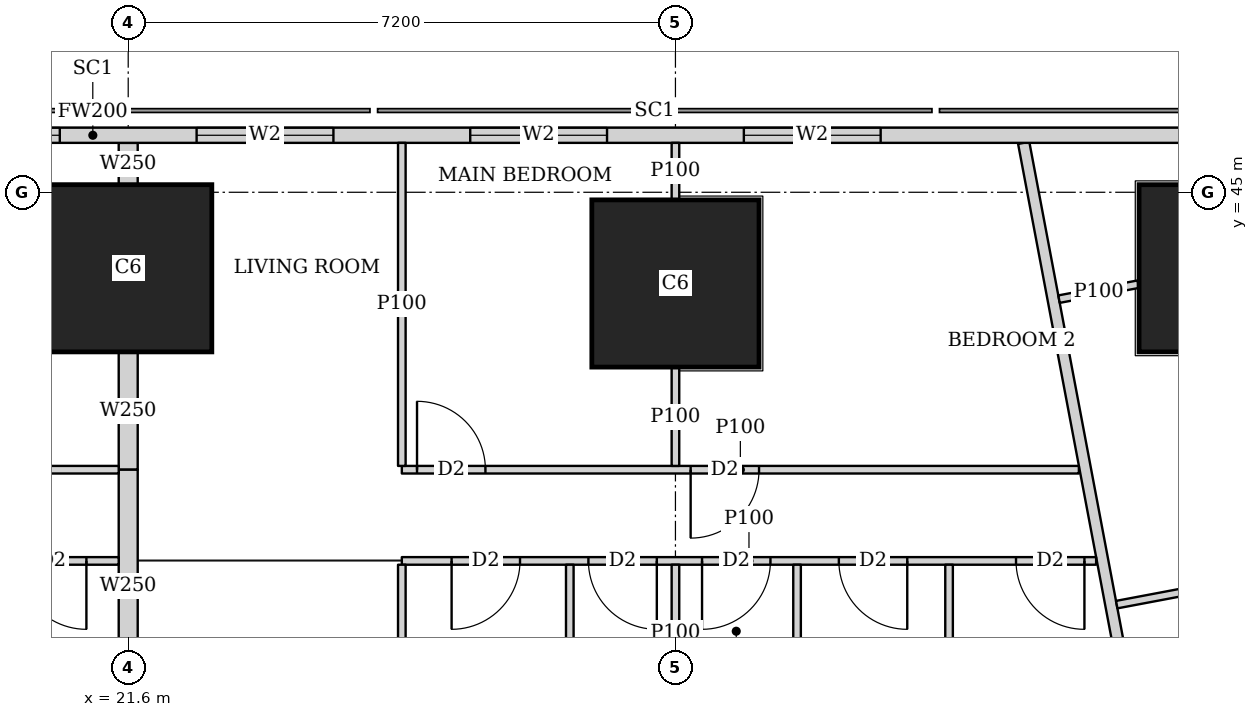
"""IFC4 building model, lengths in metres.
Left out: names, types, materials, properties, quantities, classifications, styles, units other than length and angle.
Written with IfcOpenShell. Run it as: python <this file> out.ifc"""

import sys

from ifc_helpers import new_model, si_unit, direction, frame, frame_2d, origin, origin_2d, place, context, subcontext, project, spatial, rectangle, extrude, element, fill, save


model = new_model("IFC4")
c1 = context("Model", 3, precision=1e-05, world=origin(), true_north=direction((0.0, 1.0)))
c2 = subcontext(c1, "Body", "Model", "MODEL_VIEW")
j1 = project(units=[si_unit("LENGTHUNIT", "METRE"), si_unit("PLANEANGLEUNIT", "RADIAN")], contexts=[c1])
p1 = place(None, origin())
s1 = spatial("IfcSite", under=j1, at=p1, CompositionType="ELEMENT")
p2 = place(p1, origin())
s2 = spatial("IfcBuilding", under=s1, at=p2, CompositionType="ELEMENT")
p3 = place(p2, frame((0.0, 0.0, 100.4)))
s3 = spatial("IfcBuildingStorey", under=s2, at=p3, CompositionType="ELEMENT", Elevation=100.4)
for number, where, z_axis, x_axis in (
    (1, (21.6, 44.0, 0.0), (0.0, 0.0, 1.0), (1.0, 0.0, 0.0)),
    (2, (28.8, 43.8, 0.0), (0.0, 0.0, 1.0), (1.0, 0.0, 0.0)),
    (3, (36.0, 44.0, 0.0), (0.0, 0.0, 1.0), (1.0, 0.0, 0.0)),
):
    element("IfcColumn", number, at=place(p3, frame(where, z_axis=z_axis, x_axis=x_axis)), inside=s3, PredefinedType="COLUMN", context=c2, shape_type="SweptSolid", body=[
        extrude(rectangle(XDim=2.2, YDim=2.2, at=origin_2d()), origin(), (0.0, 0.0, 1.0), 3.75),
    ])
p4 = place(p3, frame((40.106, 45.75, 0.0), z_axis=(0.0, 0.0, 1.0), x_axis=(-1.0, 0.0, 0.0)))
e4 = element("IfcWall", 4, at=p4, inside=s3, PredefinedType="SOLIDWALL", context=c2, shape_type="SweptSolid", body=[
    extrude(rectangle(XDim=37.943, YDim=0.2, at=frame_2d((18.971, 0.0))), origin(), (0.0, 0.0, 1.0), 3.5),
])
p5 = place(p4, frame((8.606, 0.0, 0.9)))
e5 = element("IfcOpeningElement", 5, at=p5, cuts=e4, PredefinedType="OPENING", context=c2, shape_type="SweptSolid", body=[
    extrude(rectangle(XDim=1.8, YDim=1.5, at=frame_2d((0.9, 0.75))), frame((0.0, 0.11, 0.0), z_axis=(0.0, -1.0, 0.0), x_axis=(1.0, 0.0, 0.0)), (0.0, 0.0, 1.0), 0.22),
])
p6 = place(p4, frame((12.206, 0.0, 0.9)))
e6 = element("IfcOpeningElement", 6, at=p6, cuts=e4, PredefinedType="OPENING", context=c2, shape_type="SweptSolid", body=[
    extrude(rectangle(XDim=1.8, YDim=1.5, at=frame_2d((0.9, 0.75))), frame((0.0, 0.11, 0.0), z_axis=(0.0, -1.0, 0.0), x_axis=(1.0, 0.0, 0.0)), (0.0, 0.0, 1.0), 0.22),
])
p7 = place(p4, frame((15.806, 0.0, 0.9)))
e7 = element("IfcOpeningElement", 7, at=p7, cuts=e4, PredefinedType="OPENING", context=c2, shape_type="SweptSolid", body=[
    extrude(rectangle(XDim=1.8, YDim=1.5, at=frame_2d((0.9, 0.75))), frame((0.0, 0.11, 0.0), z_axis=(0.0, -1.0, 0.0), x_axis=(1.0, 0.0, 0.0)), (0.0, 0.0, 1.0), 0.22),
])
p8 = place(p4, frame((19.406, 0.0, 0.9)))
e8 = element("IfcOpeningElement", 8, at=p8, cuts=e4, PredefinedType="OPENING", context=c2, shape_type="SweptSolid", body=[
    extrude(rectangle(XDim=1.8, YDim=1.5, at=frame_2d((0.9, 0.75))), frame((0.0, 0.11, 0.0), z_axis=(0.0, -1.0, 0.0), x_axis=(1.0, 0.0, 0.0)), (0.0, 0.0, 1.0), 0.22),
])
p9 = place(p4, frame((23.006, 0.0, 0.9)))
e9 = element("IfcOpeningElement", 9, at=p9, cuts=e4, PredefinedType="OPENING", context=c2, shape_type="SweptSolid", body=[
    extrude(rectangle(XDim=1.8, YDim=1.5, at=frame_2d((0.9, 0.75))), frame((0.0, 0.11, 0.0), z_axis=(0.0, -1.0, 0.0), x_axis=(1.0, 0.0, 0.0)), (0.0, 0.0, 1.0), 0.22),
])
p10 = place(p4, frame((26.606, 0.0, 0.9)))
e10 = element("IfcOpeningElement", 10, at=p10, cuts=e4, PredefinedType="OPENING", context=c2, shape_type="SweptSolid", body=[
    extrude(rectangle(XDim=1.8, YDim=1.5, at=frame_2d((0.9, 0.75))), frame((0.0, 0.11, 0.0), z_axis=(0.0, -1.0, 0.0), x_axis=(1.0, 0.0, 0.0)), (0.0, 0.0, 1.0), 0.22),
])
p11 = place(p3, frame((33.382, 45.65, 0.0), z_axis=(0.0, 0.0, 1.0), x_axis=(0.185593544777, -0.982626600565, 0.0)))
e11 = element("IfcWall", 11, at=p11, inside=s3, PredefinedType="SOLIDWALL", context=c2, shape_type="SweptSolid", body=[
    extrude(rectangle(XDim=47.118, YDim=0.15, at=frame_2d((23.559, 0.0))), origin(), (0.0, 0.0, 1.0), 2.2),
])
p12 = place(p11, frame((10.662, 0.0, 0.0)))
e12 = element("IfcOpeningElement", 12, at=p12, cuts=e11, PredefinedType="OPENING", context=c2, shape_type="SweptSolid", body=[
    extrude(rectangle(XDim=1.0, YDim=2.1, at=frame_2d((0.5, 1.05))), frame((0.0, 0.085, 0.0), z_axis=(0.0, -1.0, 0.0), x_axis=(1.0, 0.0, 0.0)), (0.0, 0.0, 1.0), 0.17),
])
p13 = place(p11, frame((15.237, 0.0, 0.0)))
e13 = element("IfcOpeningElement", 13, at=p13, cuts=e11, PredefinedType="OPENING", context=c2, shape_type="SweptSolid", body=[
    extrude(rectangle(XDim=1.0, YDim=2.1, at=frame_2d((0.5, 1.05))), frame((0.0, 0.085, 0.0), z_axis=(0.0, -1.0, 0.0), x_axis=(1.0, 0.0, 0.0)), (0.0, 0.0, 1.0), 0.17),
])
p14 = place(p11, frame((27.341, 0.0, 0.0)))
e14 = element("IfcOpeningElement", 14, at=p14, cuts=e11, PredefinedType="OPENING", context=c2, shape_type="SweptSolid", body=[
    extrude(rectangle(XDim=1.0, YDim=2.1, at=frame_2d((0.5, 1.05))), frame((0.0, 0.085, 0.0), z_axis=(0.0, -1.0, 0.0), x_axis=(1.0, 0.0, 0.0)), (0.0, 0.0, 1.0), 0.17),
])
p15 = place(p11, frame((33.833, 0.0, 0.0)))
e15 = element("IfcOpeningElement", 15, at=p15, cuts=e11, PredefinedType="OPENING", context=c2, shape_type="SweptSolid", body=[
    extrude(rectangle(XDim=1.0, YDim=2.1, at=frame_2d((0.5, 1.05))), frame((0.0, 0.085, 0.0), z_axis=(0.0, -1.0, 0.0), x_axis=(1.0, 0.0, 0.0)), (0.0, 0.0, 1.0), 0.17),
])
p16 = place(p3, frame((34.89, 43.791, 0.0), z_axis=(0.0, 0.0, 1.0), x_axis=(-0.982621304855, -0.185621580763, 0.0)))
e16 = element("IfcWall", 16, at=p16, inside=s3, PredefinedType="PARTITIONING", context=c2, shape_type="SweptSolid", body=[
    extrude(rectangle(XDim=1.062, YDim=0.1, at=frame_2d((0.531, 0.0))), origin(), (0.0, 0.0, 1.0), 2.05),
])
p17 = place(p3, frame((37.823, 40.182, 0.0), z_axis=(0.0, 0.0, 1.0), x_axis=(-0.982664729897, -0.18539155487, 0.0)))
e17 = element("IfcWall", 17, at=p17, inside=s3, PredefinedType="PARTITIONING", context=c2, shape_type="SweptSolid", body=[
    extrude(rectangle(XDim=3.274, YDim=0.1, at=frame_2d((1.637, 0.0))), origin(), (0.0, 0.0, 1.0), 3.5),
])
p18 = place(p3, frame((14.4, 41.35, 0.0), z_axis=(0.0, 0.0, 1.0), x_axis=(1.0, 0.0, 0.0)))
e18 = element("IfcWall", 18, at=p18, inside=s3, PredefinedType="PARTITIONING", context=c2, shape_type="SweptSolid", body=[
    extrude(rectangle(XDim=7.075, YDim=0.1, at=frame_2d((3.538, 0.0))), origin(), (0.0, 0.0, 1.0), 3.5),
])
p19 = place(p18, frame((0.2, 0.0, 0.0)))
e19 = element("IfcOpeningElement", 19, at=p19, cuts=e18, PredefinedType="OPENING", context=c2, shape_type="SweptSolid", body=[
    extrude(rectangle(XDim=0.9, YDim=2.1, at=frame_2d((0.45, 1.05))), frame((0.0, 0.06, 0.0), z_axis=(0.0, -1.0, 0.0), x_axis=(1.0, 0.0, 0.0)), (0.0, 0.0, 1.0), 0.12),
])
p20 = place(p18, frame((3.8, 0.0, 0.0)))
e20 = element("IfcOpeningElement", 20, at=p20, cuts=e18, PredefinedType="OPENING", context=c2, shape_type="SweptSolid", body=[
    extrude(rectangle(XDim=0.9, YDim=2.1, at=frame_2d((0.45, 1.05))), frame((0.0, 0.06, 0.0), z_axis=(0.0, -1.0, 0.0), x_axis=(1.0, 0.0, 0.0)), (0.0, 0.0, 1.0), 0.12),
])
p21 = place(p3, frame((14.4, 40.15, 0.0), z_axis=(0.0, 0.0, 1.0), x_axis=(1.0, 0.0, 0.0)))
e21 = element("IfcWall", 21, at=p21, inside=s3, PredefinedType="PARTITIONING", context=c2, shape_type="SweptSolid", body=[
    extrude(rectangle(XDim=7.075, YDim=0.1, at=frame_2d((3.538, 0.0))), origin(), (0.0, 0.0, 1.0), 3.5),
])
p22 = place(p21, frame((0.655, 0.0, 0.0)))
e22 = element("IfcOpeningElement", 22, at=p22, cuts=e21, PredefinedType="OPENING", context=c2, shape_type="SweptSolid", body=[
    extrude(rectangle(XDim=0.9, YDim=2.1, at=frame_2d((0.45, 1.05))), frame((0.0, 0.06, 0.0), z_axis=(0.0, -1.0, 0.0), x_axis=(1.0, 0.0, 0.0)), (0.0, 0.0, 1.0), 0.12),
])
p23 = place(p21, frame((3.95, 0.0, 0.0)))
e23 = element("IfcOpeningElement", 23, at=p23, cuts=e21, PredefinedType="OPENING", context=c2, shape_type="SweptSolid", body=[
    extrude(rectangle(XDim=0.9, YDim=2.1, at=frame_2d((0.45, 1.05))), frame((0.0, 0.06, 0.0), z_axis=(0.0, -1.0, 0.0), x_axis=(1.0, 0.0, 0.0)), (0.0, 0.0, 1.0), 0.12),
])
p24 = place(p21, frame((2.455, 0.0, 0.0)))
e24 = element("IfcOpeningElement", 24, at=p24, cuts=e21, PredefinedType="OPENING", context=c2, shape_type="SweptSolid", body=[
    extrude(rectangle(XDim=0.9, YDim=2.1, at=frame_2d((0.45, 1.05))), frame((0.0, 0.06, 0.0), z_axis=(0.0, -1.0, 0.0), x_axis=(1.0, 0.0, 0.0)), (0.0, 0.0, 1.0), 0.12),
])
p25 = place(p21, frame((5.75, 0.0, 0.0)))
e25 = element("IfcOpeningElement", 25, at=p25, cuts=e21, PredefinedType="OPENING", context=c2, shape_type="SweptSolid", body=[
    extrude(rectangle(XDim=0.9, YDim=2.1, at=frame_2d((0.45, 1.05))), frame((0.0, 0.06, 0.0), z_axis=(0.0, -1.0, 0.0), x_axis=(1.0, 0.0, 0.0)), (0.0, 0.0, 1.0), 0.12),
])
p26 = place(p3, frame((25.2, 41.35, 0.0), z_axis=(0.0, 0.0, 1.0), x_axis=(1.0, 0.0, 0.0)))
e26 = element("IfcWall", 26, at=p26, inside=s3, PredefinedType="PARTITIONING", context=c2, shape_type="SweptSolid", body=[
    extrude(rectangle(XDim=8.908, YDim=0.1, at=frame_2d((4.454, 0.0))), origin(), (0.0, 0.0, 1.0), 3.5),
])
p27 = place(p26, frame((0.2, 0.0, 0.0)))
e27 = element("IfcOpeningElement", 27, at=p27, cuts=e26, PredefinedType="OPENING", context=c2, shape_type="SweptSolid", body=[
    extrude(rectangle(XDim=0.9, YDim=2.1, at=frame_2d((0.45, 1.05))), frame((0.0, 0.06, 0.0), z_axis=(0.0, -1.0, 0.0), x_axis=(1.0, 0.0, 0.0)), (0.0, 0.0, 1.0), 0.12),
])
p28 = place(p26, frame((3.8, 0.0, 0.0)))
e28 = element("IfcOpeningElement", 28, at=p28, cuts=e26, PredefinedType="OPENING", context=c2, shape_type="SweptSolid", body=[
    extrude(rectangle(XDim=0.9, YDim=2.1, at=frame_2d((0.45, 1.05))), frame((0.0, 0.06, 0.0), z_axis=(0.0, -1.0, 0.0), x_axis=(1.0, 0.0, 0.0)), (0.0, 0.0, 1.0), 0.12),
])
p29 = place(p3, frame((25.2, 40.15, 0.0), z_axis=(0.0, 0.0, 1.0), x_axis=(1.0, 0.0, 0.0)))
e29 = element("IfcWall", 29, at=p29, inside=s3, PredefinedType="PARTITIONING", context=c2, shape_type="SweptSolid", body=[
    extrude(rectangle(XDim=9.135, YDim=0.1, at=frame_2d((4.567, 0.0))), origin(), (0.0, 0.0, 1.0), 3.5),
])
p30 = place(p29, frame((0.655, 0.0, 0.0)))
e30 = element("IfcOpeningElement", 30, at=p30, cuts=e29, PredefinedType="OPENING", context=c2, shape_type="SweptSolid", body=[
    extrude(rectangle(XDim=0.9, YDim=2.1, at=frame_2d((0.45, 1.05))), frame((0.0, 0.06, 0.0), z_axis=(0.0, -1.0, 0.0), x_axis=(1.0, 0.0, 0.0)), (0.0, 0.0, 1.0), 0.12),
])
p31 = place(p29, frame((3.95, 0.0, 0.0)))
e31 = element("IfcOpeningElement", 31, at=p31, cuts=e29, PredefinedType="OPENING", context=c2, shape_type="SweptSolid", body=[
    extrude(rectangle(XDim=0.9, YDim=2.1, at=frame_2d((0.45, 1.05))), frame((0.0, 0.06, 0.0), z_axis=(0.0, -1.0, 0.0), x_axis=(1.0, 0.0, 0.0)), (0.0, 0.0, 1.0), 0.12),
])
p32 = place(p29, frame((8.081, 0.0, 0.0)))
e32 = element("IfcOpeningElement", 32, at=p32, cuts=e29, PredefinedType="OPENING", context=c2, shape_type="SweptSolid", body=[
    extrude(rectangle(XDim=0.9, YDim=2.1, at=frame_2d((0.45, 1.05))), frame((0.0, 0.06, 0.0), z_axis=(0.0, -1.0, 0.0), x_axis=(1.0, 0.0, 0.0)), (0.0, 0.0, 1.0), 0.12),
])
p33 = place(p29, frame((2.455, 0.0, 0.0)))
e33 = element("IfcOpeningElement", 33, at=p33, cuts=e29, PredefinedType="OPENING", context=c2, shape_type="SweptSolid", body=[
    extrude(rectangle(XDim=0.9, YDim=2.1, at=frame_2d((0.45, 1.05))), frame((0.0, 0.06, 0.0), z_axis=(0.0, -1.0, 0.0), x_axis=(1.0, 0.0, 0.0)), (0.0, 0.0, 1.0), 0.12),
])
p34 = place(p29, frame((5.75, 0.0, 0.0)))
e34 = element("IfcOpeningElement", 34, at=p34, cuts=e29, PredefinedType="OPENING", context=c2, shape_type="SweptSolid", body=[
    extrude(rectangle(XDim=0.9, YDim=2.1, at=frame_2d((0.45, 1.05))), frame((0.0, 0.06, 0.0), z_axis=(0.0, -1.0, 0.0), x_axis=(1.0, 0.0, 0.0)), (0.0, 0.0, 1.0), 0.12),
])
p35 = place(p3, frame((25.2, 41.4, 0.0), z_axis=(0.0, 0.0, 1.0), x_axis=(0.0, 1.0, 0.0)))
e35 = element("IfcWall", 35, at=p35, inside=s3, PredefinedType="PARTITIONING", context=c2, shape_type="SweptSolid", body=[
    extrude(rectangle(XDim=4.25, YDim=0.1, at=frame_2d((2.125, 0.0))), origin(), (0.0, 0.0, 1.0), 2.2),
])
p36 = place(p3, frame((28.8, 41.4, 0.0), z_axis=(0.0, 0.0, 1.0), x_axis=(0.0, 1.0, 0.0)))
e36 = element("IfcWall", 36, at=p36, inside=s3, PredefinedType="PARTITIONING", context=c2, shape_type="SweptSolid", body=[
    extrude(rectangle(XDim=1.299, YDim=0.1, at=frame_2d((0.649, 0.0))), origin(), (0.0, 0.0, 1.0), 3.5),
])
p37 = place(p3, frame((28.8, 44.901, 0.0), z_axis=(0.0, 0.0, 1.0), x_axis=(0.0, 1.0, 0.0)))
e37 = element("IfcWall", 37, at=p37, inside=s3, PredefinedType="PARTITIONING", context=c2, shape_type="SweptSolid", body=[
    extrude(rectangle(XDim=0.749, YDim=0.1, at=frame_2d((0.375, 0.0))), origin(), (0.0, 0.0, 1.0), 3.5),
])
p38 = place(p3, frame((25.2, 36.825, 0.0), z_axis=(0.0, 0.0, 1.0), x_axis=(0.0, 1.0, 0.0)))
e38 = element("IfcWall", 38, at=p38, inside=s3, PredefinedType="PARTITIONING", context=c2, shape_type="SweptSolid", body=[
    extrude(rectangle(XDim=3.275, YDim=0.1, at=frame_2d((1.638, 0.0))), origin(), (0.0, 0.0, 1.0), 3.5),
])
p39 = place(p3, frame((28.8, 38.301, 0.0), z_axis=(0.0, 0.0, 1.0), x_axis=(0.0, 1.0, 0.0)))
e39 = element("IfcWall", 39, at=p39, inside=s3, PredefinedType="PARTITIONING", context=c2, shape_type="SweptSolid", body=[
    extrude(rectangle(XDim=1.799, YDim=0.1, at=frame_2d((0.899, 0.0))), origin(), (0.0, 0.0, 1.0), 3.5),
])
for number, where, z_axis, x_axis in (
    (40, (32.4, 36.825, 0.0), (0.0, 0.0, 1.0), (0.0, 1.0, 0.0)),
    (41, (27.41, 36.825, 0.0), (0.0, 0.0, 1.0), (0.0, 1.0, 0.0)),
    (42, (30.4, 36.825, 0.0), (0.0, 0.0, 1.0), (0.0, 1.0, 0.0)),
):
    element("IfcWall", number, at=place(p3, frame(where, z_axis=z_axis, x_axis=x_axis)), inside=s3, PredefinedType="PARTITIONING", context=c2, shape_type="SweptSolid", body=[
        extrude(rectangle(XDim=3.275, YDim=0.1, at=frame_2d((1.638, 0.0))), origin(), (0.0, 0.0, 1.0), 3.5),
    ])
p40 = place(p3, frame((21.6, 41.35, 0.0), z_axis=(0.0, 0.0, 1.0), x_axis=(0.0, 1.0, 0.0)))
e43 = element("IfcWall", 43, at=p40, inside=s3, PredefinedType="SOLIDWALL", context=c2, shape_type="SweptSolid", body=[
    extrude(rectangle(XDim=1.549, YDim=0.25, at=frame_2d((0.774, 0.0))), origin(), (0.0, 0.0, 1.0), 3.5),
])
p41 = place(p3, frame((21.6, 45.101, 0.0), z_axis=(0.0, 0.0, 1.0), x_axis=(0.0, 1.0, 0.0)))
e44 = element("IfcWall", 44, at=p41, inside=s3, PredefinedType="SOLIDWALL", context=c2, shape_type="SweptSolid", body=[
    extrude(rectangle(XDim=0.549, YDim=0.25, at=frame_2d((0.274, 0.0))), origin(), (0.0, 0.0, 1.0), 3.5),
])
p42 = place(p3, frame((21.6, 38.301, 0.0), z_axis=(0.0, 0.0, 1.0), x_axis=(0.0, 1.0, 0.0)))
e45 = element("IfcWall", 45, at=p42, inside=s3, PredefinedType="SOLIDWALL", context=c2, shape_type="SweptSolid", body=[
    extrude(rectangle(XDim=3.049, YDim=0.25, at=frame_2d((1.524, 0.0))), origin(), (0.0, 0.0, 1.0), 3.5),
])
p43 = place(p5, origin())
e46 = element("IfcWindow", 46, at=p43, inside=s3, PartitioningType="SINGLE_PANEL", PredefinedType="WINDOW", context=c2, shape_type="SweptSolid", body=[
    extrude(rectangle(XDim=1.8, YDim=1.5, at=frame_2d((0.9, 0.75))), frame((0.0, 0.03, 0.0), z_axis=(0.0, -1.0, 0.0), x_axis=(1.0, 0.0, 0.0)), (0.0, 0.0, 1.0), 0.06),
])
fill(e5, e46)
p44 = place(p6, origin())
e47 = element("IfcWindow", 47, at=p44, inside=s3, PartitioningType="SINGLE_PANEL", PredefinedType="WINDOW", context=c2, shape_type="SweptSolid", body=[
    extrude(rectangle(XDim=1.8, YDim=1.5, at=frame_2d((0.9, 0.75))), frame((0.0, 0.03, 0.0), z_axis=(0.0, -1.0, 0.0), x_axis=(1.0, 0.0, 0.0)), (0.0, 0.0, 1.0), 0.06),
])
fill(e6, e47)
p45 = place(p7, origin())
e48 = element("IfcWindow", 48, at=p45, inside=s3, PartitioningType="SINGLE_PANEL", PredefinedType="WINDOW", context=c2, shape_type="SweptSolid", body=[
    extrude(rectangle(XDim=1.8, YDim=1.5, at=frame_2d((0.9, 0.75))), frame((0.0, 0.03, 0.0), z_axis=(0.0, -1.0, 0.0), x_axis=(1.0, 0.0, 0.0)), (0.0, 0.0, 1.0), 0.06),
])
fill(e7, e48)
p46 = place(p8, origin())
e49 = element("IfcWindow", 49, at=p46, inside=s3, PartitioningType="SINGLE_PANEL", PredefinedType="WINDOW", context=c2, shape_type="SweptSolid", body=[
    extrude(rectangle(XDim=1.8, YDim=1.5, at=frame_2d((0.9, 0.75))), frame((0.0, 0.03, 0.0), z_axis=(0.0, -1.0, 0.0), x_axis=(1.0, 0.0, 0.0)), (0.0, 0.0, 1.0), 0.06),
])
fill(e8, e49)
p47 = place(p25, origin())
e50 = element("IfcDoor", 50, at=p47, inside=s3, OperationType="SINGLE_SWING_LEFT", PredefinedType="DOOR", context=c2, shape_type="SweptSolid", body=[
    extrude(rectangle(XDim=0.9, YDim=2.1, at=frame_2d((0.45, 1.05))), frame((0.0, 0.025, 0.0), z_axis=(0.0, -1.0, 0.0), x_axis=(1.0, 0.0, 0.0)), (0.0, 0.0, 1.0), 0.05),
])
fill(e25, e50)
p48 = place(p27, origin())
e51 = element("IfcDoor", 51, at=p48, inside=s3, OperationType="SINGLE_SWING_LEFT", PredefinedType="DOOR", context=c2, shape_type="SweptSolid", body=[
    extrude(rectangle(XDim=0.9, YDim=2.1, at=frame_2d((0.45, 1.05))), frame((0.0, 0.025, 0.0), z_axis=(0.0, -1.0, 0.0), x_axis=(1.0, 0.0, 0.0)), (0.0, 0.0, 1.0), 0.05),
])
fill(e27, e51)
p49 = place(p28, origin())
e52 = element("IfcDoor", 52, at=p49, inside=s3, OperationType="SINGLE_SWING_RIGHT", PredefinedType="DOOR", context=c2, shape_type="SweptSolid", body=[
    extrude(rectangle(XDim=0.9, YDim=2.1, at=frame_2d((0.45, 1.05))), frame((0.0, 0.025, 0.0), z_axis=(0.0, -1.0, 0.0), x_axis=(1.0, 0.0, 0.0)), (0.0, 0.0, 1.0), 0.05),
])
fill(e28, e52)
p50 = place(p30, origin())
e53 = element("IfcDoor", 53, at=p50, inside=s3, OperationType="SINGLE_SWING_RIGHT", PredefinedType="DOOR", context=c2, shape_type="SweptSolid", body=[
    extrude(rectangle(XDim=0.9, YDim=2.1, at=frame_2d((0.45, 1.05))), frame((0.0, 0.025, 0.0), z_axis=(0.0, -1.0, 0.0), x_axis=(1.0, 0.0, 0.0)), (0.0, 0.0, 1.0), 0.05),
])
fill(e30, e53)
p51 = place(p31, origin())
e54 = element("IfcDoor", 54, at=p51, inside=s3, OperationType="SINGLE_SWING_RIGHT", PredefinedType="DOOR", context=c2, shape_type="SweptSolid", body=[
    extrude(rectangle(XDim=0.9, YDim=2.1, at=frame_2d((0.45, 1.05))), frame((0.0, 0.025, 0.0), z_axis=(0.0, -1.0, 0.0), x_axis=(1.0, 0.0, 0.0)), (0.0, 0.0, 1.0), 0.05),
])
fill(e31, e54)
p52 = place(p32, origin())
e55 = element("IfcDoor", 55, at=p52, inside=s3, OperationType="SINGLE_SWING_LEFT", PredefinedType="DOOR", context=c2, shape_type="SweptSolid", body=[
    extrude(rectangle(XDim=0.9, YDim=2.1, at=frame_2d((0.45, 1.05))), frame((0.0, 0.025, 0.0), z_axis=(0.0, -1.0, 0.0), x_axis=(1.0, 0.0, 0.0)), (0.0, 0.0, 1.0), 0.05),
])
fill(e32, e55)
p53 = place(p33, origin())
e56 = element("IfcDoor", 56, at=p53, inside=s3, OperationType="SINGLE_SWING_LEFT", PredefinedType="DOOR", context=c2, shape_type="SweptSolid", body=[
    extrude(rectangle(XDim=0.9, YDim=2.1, at=frame_2d((0.45, 1.05))), frame((0.0, 0.025, 0.0), z_axis=(0.0, -1.0, 0.0), x_axis=(1.0, 0.0, 0.0)), (0.0, 0.0, 1.0), 0.05),
])
fill(e33, e56)
p54 = place(p34, origin())
e57 = element("IfcDoor", 57, at=p54, inside=s3, OperationType="SINGLE_SWING_LEFT", PredefinedType="DOOR", context=c2, shape_type="SweptSolid", body=[
    extrude(rectangle(XDim=0.9, YDim=2.1, at=frame_2d((0.45, 1.05))), frame((0.0, 0.025, 0.0), z_axis=(0.0, -1.0, 0.0), x_axis=(1.0, 0.0, 0.0)), (0.0, 0.0, 1.0), 0.05),
])
fill(e34, e57)
save(model, sys.argv[1])
